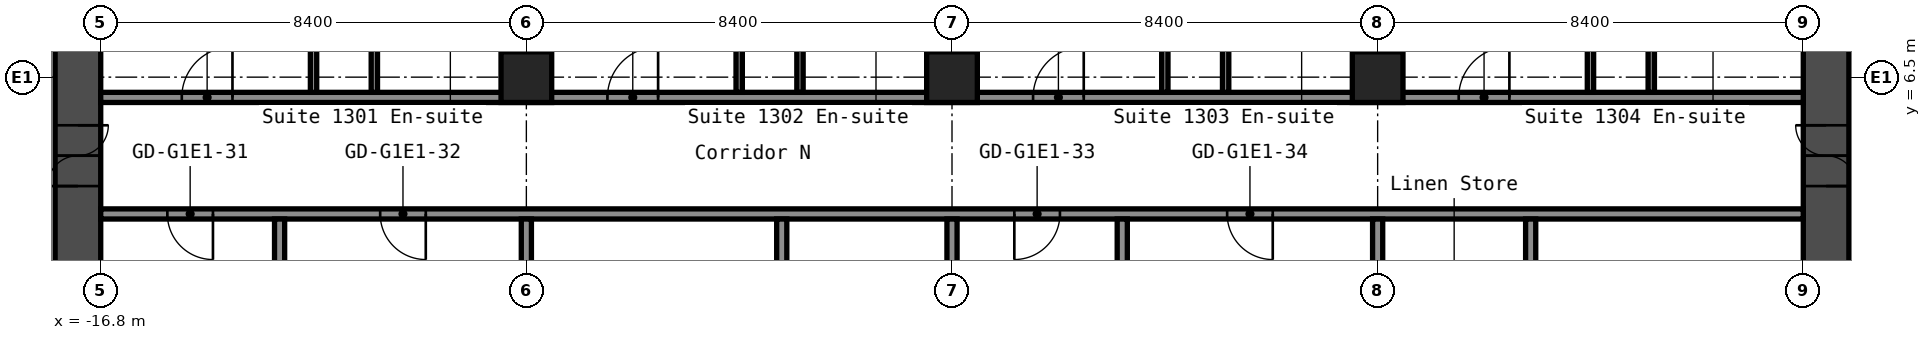
"""IFC4 building model, lengths in metres.
Left out: names, types, materials, properties, quantities, classifications, styles, units other than length and angle.
Written with IfcOpenShell. Run it as: python <this file> out.ifc"""

import sys

from ifc_helpers import new_model, si_unit, direction, frame, frame_2d, origin, origin_2d, place, context, subcontext, project, spatial, rectangle, hollow_rectangle, extrude, element, fill, save


model = new_model("IFC4")
c1 = context("Model", 3, precision=1e-05, world=origin(), true_north=direction((0.0, 1.0)))
c2 = subcontext(c1, "Body", "Model", "MODEL_VIEW")
j1 = project(units=[si_unit("LENGTHUNIT", "METRE"), si_unit("PLANEANGLEUNIT", "RADIAN")], contexts=[c1])
p1 = place(None, origin())
s1 = spatial("IfcSite", under=j1, at=p1, CompositionType="ELEMENT")
p2 = place(p1, origin())
s2 = spatial("IfcBuilding", under=s1, at=p2, CompositionType="ELEMENT")
p3 = place(p2, frame((0.0, 0.0, 48.6)))
s3 = spatial("IfcBuildingStorey", under=s2, at=p3, CompositionType="ELEMENT", Elevation=48.6)
for number, where, z_axis, x_axis in (
    (1, (-8.4, 6.5, 0.0), (0.0, 0.0, 1.0), (1.0, 0.0, 0.0)),
    (2, (0.0, 6.5, 0.0), (0.0, 0.0, 1.0), (1.0, 0.0, 0.0)),
    (3, (8.4, 6.5, 0.0), (0.0, 0.0, 1.0), (1.0, 0.0, 0.0)),
):
    element("IfcColumn", number, at=place(p3, frame(where, z_axis=z_axis, x_axis=x_axis)), inside=s3, PredefinedType="COLUMN", context=c2, shape_type="SweptSolid", body=[
        extrude(hollow_rectangle(XDim=1.0, YDim=1.0, WallThickness=0.04, at=origin_2d()), origin(), (0.0, 0.0, 1.0), 2.8),
    ])
p4 = place(p3, frame((-17.25, -8.4, 0.0), z_axis=(0.0, 0.0, 1.0), x_axis=(0.0, 1.0, 0.0)))
e4 = element("IfcWall", 4, at=p4, inside=s3, PredefinedType="SHEAR", context=c2, shape_type="SweptSolid", body=[
    extrude(rectangle(XDim=16.8, YDim=0.9, at=frame_2d((8.4, 0.0))), origin(), (0.0, 0.0, 1.0), 2.8),
])
p5 = place(p4, frame((12.75, 0.0, 0.0)))
e5 = element("IfcOpeningElement", 5, at=p5, cuts=e4, PredefinedType="OPENING", context=c2, shape_type="SweptSolid", body=[
    extrude(rectangle(XDim=1.2, YDim=2.1, at=frame_2d((0.6, 1.05))), frame((0.0, 0.46, 0.0), z_axis=(0.0, -1.0, 0.0), x_axis=(1.0, 0.0, 0.0)), (0.0, 0.0, 1.0), 0.92),
])
p6 = place(p4, frame((2.85, 0.0, 0.0)))
e6 = element("IfcOpeningElement", 6, at=p6, cuts=e4, PredefinedType="OPENING", context=c2, shape_type="SweptSolid", body=[
    extrude(rectangle(XDim=1.2, YDim=2.1, at=frame_2d((0.6, 1.05))), frame((0.0, 0.46, 0.0), z_axis=(0.0, -1.0, 0.0), x_axis=(1.0, 0.0, 0.0)), (0.0, 0.0, 1.0), 0.92),
])
p7 = place(p3, frame((17.25, -8.4, 0.0), z_axis=(0.0, 0.0, 1.0), x_axis=(0.0, 1.0, 0.0)))
e7 = element("IfcWall", 7, at=p7, inside=s3, PredefinedType="SHEAR", context=c2, shape_type="SweptSolid", body=[
    extrude(rectangle(XDim=16.8, YDim=0.9, at=frame_2d((8.4, 0.0))), origin(), (0.0, 0.0, 1.0), 2.8),
])
p8 = place(p7, frame((12.75, 0.0, 0.0)))
e8 = element("IfcOpeningElement", 8, at=p8, cuts=e7, PredefinedType="OPENING", context=c2, shape_type="SweptSolid", body=[
    extrude(rectangle(XDim=1.2, YDim=2.1, at=frame_2d((0.6, 1.05))), frame((0.0, 0.46, 0.0), z_axis=(0.0, -1.0, 0.0), x_axis=(1.0, 0.0, 0.0)), (0.0, 0.0, 1.0), 0.92),
])
p9 = place(p7, frame((2.85, 0.0, 0.0)))
e9 = element("IfcOpeningElement", 9, at=p9, cuts=e7, PredefinedType="OPENING", context=c2, shape_type="SweptSolid", body=[
    extrude(rectangle(XDim=1.2, YDim=2.1, at=frame_2d((0.6, 1.05))), frame((0.0, 0.46, 0.0), z_axis=(0.0, -1.0, 0.0), x_axis=(1.0, 0.0, 0.0)), (0.0, 0.0, 1.0), 0.92),
])
p10 = place(p3, frame((-16.8, 3.8, 0.0), z_axis=(0.0, 0.0, 1.0), x_axis=(1.0, 0.0, 0.0)))
e10 = element("IfcWall", 10, at=p10, inside=s3, PredefinedType="PARTITIONING", context=c2, shape_type="SweptSolid", body=[
    extrude(rectangle(XDim=33.6, YDim=0.2, at=frame_2d((16.8, 0.0))), origin(), (0.0, 0.0, 1.0), 2.8),
])
p11 = place(p10, frame((1.315, 0.0, 0.0)))
e11 = element("IfcOpeningElement", 11, at=p11, cuts=e10, PredefinedType="OPENING", context=c2, shape_type="SweptSolid", body=[
    extrude(rectangle(XDim=0.9, YDim=2.1, at=frame_2d((0.45, 1.05))), frame((0.0, 0.11, 0.0), z_axis=(0.0, -1.0, 0.0), x_axis=(1.0, 0.0, 0.0)), (0.0, 0.0, 1.0), 0.22),
])
p12 = place(p10, frame((5.515, 0.0, 0.0)))
e12 = element("IfcOpeningElement", 12, at=p12, cuts=e10, PredefinedType="OPENING", context=c2, shape_type="SweptSolid", body=[
    extrude(rectangle(XDim=0.9, YDim=2.1, at=frame_2d((0.45, 1.05))), frame((0.0, 0.11, 0.0), z_axis=(0.0, -1.0, 0.0), x_axis=(1.0, 0.0, 0.0)), (0.0, 0.0, 1.0), 0.22),
])
p13 = place(p10, frame((18.03, 0.0, 0.0)))
e13 = element("IfcOpeningElement", 13, at=p13, cuts=e10, PredefinedType="OPENING", context=c2, shape_type="SweptSolid", body=[
    extrude(rectangle(XDim=0.9, YDim=2.1, at=frame_2d((0.45, 1.05))), frame((0.0, 0.11, 0.0), z_axis=(0.0, -1.0, 0.0), x_axis=(1.0, 0.0, 0.0)), (0.0, 0.0, 1.0), 0.22),
])
p14 = place(p10, frame((22.23, 0.0, 0.0)))
e14 = element("IfcOpeningElement", 14, at=p14, cuts=e10, PredefinedType="OPENING", context=c2, shape_type="SweptSolid", body=[
    extrude(rectangle(XDim=0.9, YDim=2.1, at=frame_2d((0.45, 1.05))), frame((0.0, 0.11, 0.0), z_axis=(0.0, -1.0, 0.0), x_axis=(1.0, 0.0, 0.0)), (0.0, 0.0, 1.0), 0.22),
])
p15 = place(p3, frame((-16.8, 6.1, 0.0), z_axis=(0.0, 0.0, 1.0), x_axis=(1.0, 0.0, 0.0)))
e15 = element("IfcWall", 15, at=p15, inside=s3, PredefinedType="PARTITIONING", context=c2, shape_type="SweptSolid", body=[
    extrude(rectangle(XDim=33.6, YDim=0.2, at=frame_2d((16.8, 0.0))), origin(), (0.0, 0.0, 1.0), 2.8),
])
p16 = place(p15, frame((1.6, 0.0, 0.0)))
e16 = element("IfcOpeningElement", 16, at=p16, cuts=e15, PredefinedType="OPENING", context=c2, shape_type="SweptSolid", body=[
    extrude(rectangle(XDim=1.0, YDim=2.1, at=frame_2d((0.5, 1.05))), frame((0.0, 0.11, 0.0), z_axis=(0.0, -1.0, 0.0), x_axis=(1.0, 0.0, 0.0)), (0.0, 0.0, 1.0), 0.22),
])
p17 = place(p15, frame((10.0, 0.0, 0.0)))
e17 = element("IfcOpeningElement", 17, at=p17, cuts=e15, PredefinedType="OPENING", context=c2, shape_type="SweptSolid", body=[
    extrude(rectangle(XDim=1.0, YDim=2.1, at=frame_2d((0.5, 1.05))), frame((0.0, 0.11, 0.0), z_axis=(0.0, -1.0, 0.0), x_axis=(1.0, 0.0, 0.0)), (0.0, 0.0, 1.0), 0.22),
])
p18 = place(p15, frame((18.4, 0.0, 0.0)))
e18 = element("IfcOpeningElement", 18, at=p18, cuts=e15, PredefinedType="OPENING", context=c2, shape_type="SweptSolid", body=[
    extrude(rectangle(XDim=1.0, YDim=2.1, at=frame_2d((0.5, 1.05))), frame((0.0, 0.11, 0.0), z_axis=(0.0, -1.0, 0.0), x_axis=(1.0, 0.0, 0.0)), (0.0, 0.0, 1.0), 0.22),
])
p19 = place(p15, frame((26.8, 0.0, 0.0)))
e19 = element("IfcOpeningElement", 19, at=p19, cuts=e15, PredefinedType="OPENING", context=c2, shape_type="SweptSolid", body=[
    extrude(rectangle(XDim=1.0, YDim=2.1, at=frame_2d((0.5, 1.05))), frame((0.0, 0.11, 0.0), z_axis=(0.0, -1.0, 0.0), x_axis=(1.0, 0.0, 0.0)), (0.0, 0.0, 1.0), 0.22),
])
p20 = place(p3, frame((-13.27, -3.7, 0.0), z_axis=(0.0, 0.0, 1.0), x_axis=(0.0, 1.0, 0.0)))
e20 = element("IfcWall", 20, at=p20, inside=s3, PredefinedType="PARTITIONING", context=c2, shape_type="SweptSolid", body=[
    extrude(rectangle(XDim=7.4, YDim=0.2, at=frame_2d((3.7, 0.0))), origin(), (0.0, 0.0, 1.0), 2.8),
])
p21 = place(p3, frame((-12.6, 6.2, 0.0), z_axis=(0.0, 0.0, 1.0), x_axis=(0.0, 1.0, 0.0)))
e21 = element("IfcWall", 21, at=p21, inside=s3, PredefinedType="PARTITIONING", context=c2, shape_type="SweptSolid", body=[
    extrude(rectangle(XDim=14.1, YDim=0.125, at=frame_2d((7.05, 0.0))), origin(), (0.0, 0.0, 1.0), 2.8),
])
p22 = place(p21, frame((4.05, 0.0, 0.0)))
e22 = element("IfcOpeningElement", 22, at=p22, cuts=e21, PredefinedType="OPENING", context=c2, shape_type="SweptSolid", body=[
    extrude(rectangle(XDim=0.9, YDim=2.1, at=frame_2d((0.45, 1.05))), frame((0.0, 0.073, 0.0), z_axis=(0.0, -1.0, 0.0), x_axis=(1.0, 0.0, 0.0)), (0.0, 0.0, 1.0), 0.145),
])
p23 = place(p3, frame((-11.4, 6.2, 0.0), z_axis=(0.0, 0.0, 1.0), x_axis=(0.0, 1.0, 0.0)))
e23 = element("IfcWall", 23, at=p23, inside=s3, PredefinedType="PARTITIONING", context=c2, shape_type="SweptSolid", body=[
    extrude(rectangle(XDim=3.1, YDim=0.125, at=frame_2d((1.55, 0.0))), origin(), (0.0, 0.0, 1.0), 2.8),
])
p24 = place(p3, frame((-8.4, -3.7, 0.0), z_axis=(0.0, 0.0, 1.0), x_axis=(0.0, 1.0, 0.0)))
e24 = element("IfcWall", 24, at=p24, inside=s3, PredefinedType="PARTITIONING", context=c2, shape_type="SweptSolid", body=[
    extrude(rectangle(XDim=7.4, YDim=0.2, at=frame_2d((3.7, 0.0))), origin(), (0.0, 0.0, 1.0), 2.8),
])
p25 = place(p3, frame((-8.4, 6.99, 0.0), z_axis=(0.0, 0.0, 1.0), x_axis=(0.0, 1.0, 0.0)))
e25 = element("IfcWall", 25, at=p25, inside=s3, PredefinedType="PARTITIONING", context=c2, shape_type="SweptSolid", body=[
    extrude(rectangle(XDim=13.31, YDim=0.2, at=frame_2d((6.655, 0.0))), origin(), (0.0, 0.0, 1.0), 2.8),
])
p26 = place(p3, frame((-4.2, 6.2, 0.0), z_axis=(0.0, 0.0, 1.0), x_axis=(0.0, 1.0, 0.0)))
e26 = element("IfcWall", 26, at=p26, inside=s3, PredefinedType="PARTITIONING", context=c2, shape_type="SweptSolid", body=[
    extrude(rectangle(XDim=14.1, YDim=0.125, at=frame_2d((7.05, 0.0))), origin(), (0.0, 0.0, 1.0), 2.8),
])
p27 = place(p26, frame((4.05, 0.0, 0.0)))
e27 = element("IfcOpeningElement", 27, at=p27, cuts=e26, PredefinedType="OPENING", context=c2, shape_type="SweptSolid", body=[
    extrude(rectangle(XDim=0.9, YDim=2.1, at=frame_2d((0.45, 1.05))), frame((0.0, 0.073, 0.0), z_axis=(0.0, -1.0, 0.0), x_axis=(1.0, 0.0, 0.0)), (0.0, 0.0, 1.0), 0.145),
])
p28 = place(p3, frame((-3.36, -3.7, 0.0), z_axis=(0.0, 0.0, 1.0), x_axis=(0.0, 1.0, 0.0)))
e28 = element("IfcWall", 28, at=p28, inside=s3, PredefinedType="PARTITIONING", context=c2, shape_type="SweptSolid", body=[
    extrude(rectangle(XDim=7.4, YDim=0.2, at=frame_2d((3.7, 0.0))), origin(), (0.0, 0.0, 1.0), 2.8),
])
p29 = place(p3, frame((-3.0, 6.2, 0.0), z_axis=(0.0, 0.0, 1.0), x_axis=(0.0, 1.0, 0.0)))
e29 = element("IfcWall", 29, at=p29, inside=s3, PredefinedType="PARTITIONING", context=c2, shape_type="SweptSolid", body=[
    extrude(rectangle(XDim=3.1, YDim=0.125, at=frame_2d((1.55, 0.0))), origin(), (0.0, 0.0, 1.0), 2.8),
])
p30 = place(p3, frame((0.0, -3.7, 0.0), z_axis=(0.0, 0.0, 1.0), x_axis=(0.0, 1.0, 0.0)))
e30 = element("IfcWall", 30, at=p30, inside=s3, PredefinedType="PARTITIONING", context=c2, shape_type="SweptSolid", body=[
    extrude(rectangle(XDim=7.4, YDim=0.2, at=frame_2d((3.7, 0.0))), origin(), (0.0, 0.0, 1.0), 2.8),
])
p31 = place(p3, frame((0.0, 6.99, 0.0), z_axis=(0.0, 0.0, 1.0), x_axis=(0.0, 1.0, 0.0)))
e31 = element("IfcWall", 31, at=p31, inside=s3, PredefinedType="PARTITIONING", context=c2, shape_type="SweptSolid", body=[
    extrude(rectangle(XDim=13.31, YDim=0.2, at=frame_2d((6.655, 0.0))), origin(), (0.0, 0.0, 1.0), 2.8),
])
p32 = place(p3, frame((3.36, -3.7, 0.0), z_axis=(0.0, 0.0, 1.0), x_axis=(0.0, 1.0, 0.0)))
e32 = element("IfcWall", 32, at=p32, inside=s3, PredefinedType="PARTITIONING", context=c2, shape_type="SweptSolid", body=[
    extrude(rectangle(XDim=7.4, YDim=0.2, at=frame_2d((3.7, 0.0))), origin(), (0.0, 0.0, 1.0), 2.8),
])
p33 = place(p3, frame((4.2, 6.2, 0.0), z_axis=(0.0, 0.0, 1.0), x_axis=(0.0, 1.0, 0.0)))
e33 = element("IfcWall", 33, at=p33, inside=s3, PredefinedType="PARTITIONING", context=c2, shape_type="SweptSolid", body=[
    extrude(rectangle(XDim=14.1, YDim=0.125, at=frame_2d((7.05, 0.0))), origin(), (0.0, 0.0, 1.0), 2.8),
])
p34 = place(p33, frame((4.05, 0.0, 0.0)))
e34 = element("IfcOpeningElement", 34, at=p34, cuts=e33, PredefinedType="OPENING", context=c2, shape_type="SweptSolid", body=[
    extrude(rectangle(XDim=0.9, YDim=2.1, at=frame_2d((0.45, 1.05))), frame((0.0, 0.073, 0.0), z_axis=(0.0, -1.0, 0.0), x_axis=(1.0, 0.0, 0.0)), (0.0, 0.0, 1.0), 0.145),
])
p35 = place(p3, frame((5.4, 6.2, 0.0), z_axis=(0.0, 0.0, 1.0), x_axis=(0.0, 1.0, 0.0)))
e35 = element("IfcWall", 35, at=p35, inside=s3, PredefinedType="PARTITIONING", context=c2, shape_type="SweptSolid", body=[
    extrude(rectangle(XDim=3.1, YDim=0.125, at=frame_2d((1.55, 0.0))), origin(), (0.0, 0.0, 1.0), 2.8),
])
p36 = place(p3, frame((8.4, -3.7, 0.0), z_axis=(0.0, 0.0, 1.0), x_axis=(0.0, 1.0, 0.0)))
e36 = element("IfcWall", 36, at=p36, inside=s3, PredefinedType="PARTITIONING", context=c2, shape_type="SweptSolid", body=[
    extrude(rectangle(XDim=7.4, YDim=0.2, at=frame_2d((3.7, 0.0))), origin(), (0.0, 0.0, 1.0), 2.8),
])
p37 = place(p3, frame((8.4, 6.99, 0.0), z_axis=(0.0, 0.0, 1.0), x_axis=(0.0, 1.0, 0.0)))
e37 = element("IfcWall", 37, at=p37, inside=s3, PredefinedType="PARTITIONING", context=c2, shape_type="SweptSolid", body=[
    extrude(rectangle(XDim=13.31, YDim=0.2, at=frame_2d((6.655, 0.0))), origin(), (0.0, 0.0, 1.0), 2.8),
])
p38 = place(p3, frame((11.42, -3.7, 0.0), z_axis=(0.0, 0.0, 1.0), x_axis=(0.0, 1.0, 0.0)))
e38 = element("IfcWall", 38, at=p38, inside=s3, PredefinedType="PARTITIONING", context=c2, shape_type="SweptSolid", body=[
    extrude(rectangle(XDim=7.4, YDim=0.2, at=frame_2d((3.7, 0.0))), origin(), (0.0, 0.0, 1.0), 2.8),
])
p39 = place(p3, frame((12.6, 6.2, 0.0), z_axis=(0.0, 0.0, 1.0), x_axis=(0.0, 1.0, 0.0)))
e39 = element("IfcWall", 39, at=p39, inside=s3, PredefinedType="PARTITIONING", context=c2, shape_type="SweptSolid", body=[
    extrude(rectangle(XDim=14.1, YDim=0.125, at=frame_2d((7.05, 0.0))), origin(), (0.0, 0.0, 1.0), 2.8),
])
p40 = place(p39, frame((4.05, 0.0, 0.0)))
e40 = element("IfcOpeningElement", 40, at=p40, cuts=e39, PredefinedType="OPENING", context=c2, shape_type="SweptSolid", body=[
    extrude(rectangle(XDim=0.9, YDim=2.1, at=frame_2d((0.45, 1.05))), frame((0.0, 0.073, 0.0), z_axis=(0.0, -1.0, 0.0), x_axis=(1.0, 0.0, 0.0)), (0.0, 0.0, 1.0), 0.145),
])
p41 = place(p3, frame((13.8, 6.2, 0.0), z_axis=(0.0, 0.0, 1.0), x_axis=(0.0, 1.0, 0.0)))
e41 = element("IfcWall", 41, at=p41, inside=s3, PredefinedType="PARTITIONING", context=c2, shape_type="SweptSolid", body=[
    extrude(rectangle(XDim=3.1, YDim=0.125, at=frame_2d((1.55, 0.0))), origin(), (0.0, 0.0, 1.0), 2.8),
])
p42 = place(p5, origin())
e42 = element("IfcDoor", 42, at=p42, inside=s3, OperationType="DOUBLE_DOOR_SINGLE_SWING", PredefinedType="DOOR", context=c2, shape_type="SweptSolid", body=[
    extrude(rectangle(XDim=1.2, YDim=2.1, at=frame_2d((0.6, 1.05))), frame((0.0, 0.025, 0.0), z_axis=(0.0, -1.0, 0.0), x_axis=(1.0, 0.0, 0.0)), (0.0, 0.0, 1.0), 0.05),
])
fill(e5, e42)
p43 = place(p8, origin())
e43 = element("IfcDoor", 43, at=p43, inside=s3, OperationType="DOUBLE_DOOR_SINGLE_SWING", PredefinedType="DOOR", context=c2, shape_type="SweptSolid", body=[
    extrude(rectangle(XDim=1.2, YDim=2.1, at=frame_2d((0.6, 1.05))), frame((0.0, 0.025, 0.0), z_axis=(0.0, -1.0, 0.0), x_axis=(1.0, 0.0, 0.0)), (0.0, 0.0, 1.0), 0.05),
])
fill(e8, e43)
p44 = place(p11, origin())
e44 = element("IfcDoor", 44, at=p44, inside=s3, OperationType="SINGLE_SWING_RIGHT", PredefinedType="DOOR", context=c2, shape_type="SweptSolid", body=[
    extrude(rectangle(XDim=0.9, YDim=2.1, at=frame_2d((0.45, 1.05))), frame((0.0, 0.025, 0.0), z_axis=(0.0, -1.0, 0.0), x_axis=(1.0, 0.0, 0.0)), (0.0, 0.0, 1.0), 0.05),
])
fill(e11, e44)
p45 = place(p12, origin())
e45 = element("IfcDoor", 45, at=p45, inside=s3, OperationType="SINGLE_SWING_RIGHT", PredefinedType="DOOR", context=c2, shape_type="SweptSolid", body=[
    extrude(rectangle(XDim=0.9, YDim=2.1, at=frame_2d((0.45, 1.05))), frame((0.0, 0.025, 0.0), z_axis=(0.0, -1.0, 0.0), x_axis=(1.0, 0.0, 0.0)), (0.0, 0.0, 1.0), 0.05),
])
fill(e12, e45)
p46 = place(p13, origin())
e46 = element("IfcDoor", 46, at=p46, inside=s3, OperationType="SINGLE_SWING_LEFT", PredefinedType="DOOR", context=c2, shape_type="SweptSolid", body=[
    extrude(rectangle(XDim=0.9, YDim=2.1, at=frame_2d((0.45, 1.05))), frame((0.0, 0.025, 0.0), z_axis=(0.0, -1.0, 0.0), x_axis=(1.0, 0.0, 0.0)), (0.0, 0.0, 1.0), 0.05),
])
fill(e13, e46)
p47 = place(p14, origin())
e47 = element("IfcDoor", 47, at=p47, inside=s3, OperationType="SINGLE_SWING_RIGHT", PredefinedType="DOOR", context=c2, shape_type="SweptSolid", body=[
    extrude(rectangle(XDim=0.9, YDim=2.1, at=frame_2d((0.45, 1.05))), frame((0.0, 0.025, 0.0), z_axis=(0.0, -1.0, 0.0), x_axis=(1.0, 0.0, 0.0)), (0.0, 0.0, 1.0), 0.05),
])
fill(e14, e47)
p48 = place(p16, origin())
e48 = element("IfcDoor", 48, at=p48, inside=s3, OperationType="SINGLE_SWING_LEFT", PredefinedType="DOOR", context=c2, shape_type="SweptSolid", body=[
    extrude(rectangle(XDim=1.0, YDim=2.1, at=frame_2d((0.5, 1.05))), frame((0.0, 0.025, 0.0), z_axis=(0.0, -1.0, 0.0), x_axis=(1.0, 0.0, 0.0)), (0.0, 0.0, 1.0), 0.05),
])
fill(e16, e48)
p49 = place(p17, origin())
e49 = element("IfcDoor", 49, at=p49, inside=s3, OperationType="SINGLE_SWING_LEFT", PredefinedType="DOOR", context=c2, shape_type="SweptSolid", body=[
    extrude(rectangle(XDim=1.0, YDim=2.1, at=frame_2d((0.5, 1.05))), frame((0.0, 0.025, 0.0), z_axis=(0.0, -1.0, 0.0), x_axis=(1.0, 0.0, 0.0)), (0.0, 0.0, 1.0), 0.05),
])
fill(e17, e49)
p50 = place(p18, origin())
e50 = element("IfcDoor", 50, at=p50, inside=s3, OperationType="SINGLE_SWING_LEFT", PredefinedType="DOOR", context=c2, shape_type="SweptSolid", body=[
    extrude(rectangle(XDim=1.0, YDim=2.1, at=frame_2d((0.5, 1.05))), frame((0.0, 0.025, 0.0), z_axis=(0.0, -1.0, 0.0), x_axis=(1.0, 0.0, 0.0)), (0.0, 0.0, 1.0), 0.05),
])
fill(e18, e50)
p51 = place(p19, origin())
e51 = element("IfcDoor", 51, at=p51, inside=s3, OperationType="SINGLE_SWING_LEFT", PredefinedType="DOOR", context=c2, shape_type="SweptSolid", body=[
    extrude(rectangle(XDim=1.0, YDim=2.1, at=frame_2d((0.5, 1.05))), frame((0.0, 0.025, 0.0), z_axis=(0.0, -1.0, 0.0), x_axis=(1.0, 0.0, 0.0)), (0.0, 0.0, 1.0), 0.05),
])
fill(e19, e51)
save(model, sys.argv[1])
